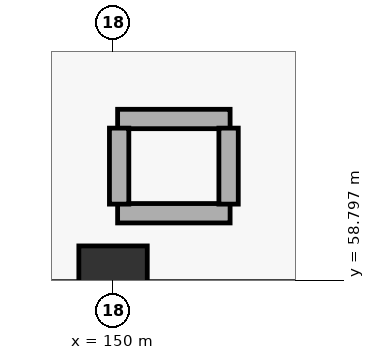
"""IFC4 building model, lengths in metres.
Left out: names, types, materials, properties, quantities, classifications, styles, units other than length and angle.
Written with IfcOpenShell. Run it as: python <this file> out.ifc"""

import sys

from ifc_helpers import new_model, si_unit, direction, frame, frame_2d, origin, origin_2d, place, context, subcontext, project, spatial, rectangle, extrude, element, save


model = new_model("IFC4")
c1 = context("Model", 3, precision=1e-05, world=origin(), true_north=direction((0.0, 1.0)))
c2 = subcontext(c1, "Body", "Model", "MODEL_VIEW")
j1 = project(units=[si_unit("LENGTHUNIT", "METRE"), si_unit("PLANEANGLEUNIT", "RADIAN")], contexts=[c1])
p1 = place(None, origin())
s1 = spatial("IfcSite", under=j1, at=p1, CompositionType="ELEMENT")
p2 = place(p1, origin())
s2 = spatial("IfcBuilding", under=s1, at=p2, CompositionType="ELEMENT")
p3 = place(p2, origin())
s3 = spatial("IfcBuildingStorey", under=s2, at=p3, CompositionType="ELEMENT", Elevation=0.0)
p4 = place(p3, frame((150.0, 58.8, 0.0), z_axis=(0.0, 0.0, 1.0), x_axis=(1.0, 0.0, 0.0)))
e1 = element("IfcColumn", 1, at=p4, inside=s3, PredefinedType="COLUMN", context=c2, shape_type="SweptSolid", body=[
    extrude(rectangle(XDim=0.9, YDim=0.9, at=origin_2d()), origin(), (0.0, 0.0, 1.0), 5.4),
])
for number, where, z_axis, x_axis in (
    (2, (150.06, 60.92, 0.0), (0.0, 0.0, 1.0), (1.0, 0.0, 0.0)),
    (3, (150.06, 59.68, 0.0), (0.0, 0.0, 1.0), (1.0, 0.0, 0.0)),
):
    element("IfcWall", number, at=place(p3, frame(where, z_axis=z_axis, x_axis=x_axis)), inside=s3, PredefinedType="PARTITIONING", context=c2, shape_type="SweptSolid", body=[
        extrude(rectangle(XDim=1.48, YDim=0.255, at=frame_2d((0.74, 0.0))), origin(), (0.0, 0.0, 1.0), 4.29),
    ])
p5 = place(p3, frame((150.08, 59.8, 0.0), z_axis=(0.0, 0.0, 1.0), x_axis=(0.0, 1.0, 0.0)))
e4 = element("IfcWall", 4, at=p5, inside=s3, PredefinedType="PARTITIONING", context=c2, shape_type="SweptSolid", body=[
    extrude(rectangle(XDim=1.0, YDim=0.255, at=frame_2d((0.5, 0.0))), origin(), (0.0, 0.0, 1.0), 4.29),
])
p6 = place(p3, frame((151.52, 59.8, 0.0), z_axis=(0.0, 0.0, 1.0), x_axis=(0.0, 1.0, 0.0)))
e5 = element("IfcWall", 5, at=p6, inside=s3, PredefinedType="PARTITIONING", context=c2, shape_type="SweptSolid", body=[
    extrude(rectangle(XDim=1.0, YDim=0.255, at=frame_2d((0.5, 0.0))), origin(), (0.0, 0.0, 1.0), 5.04),
])
save(model, sys.argv[1])
